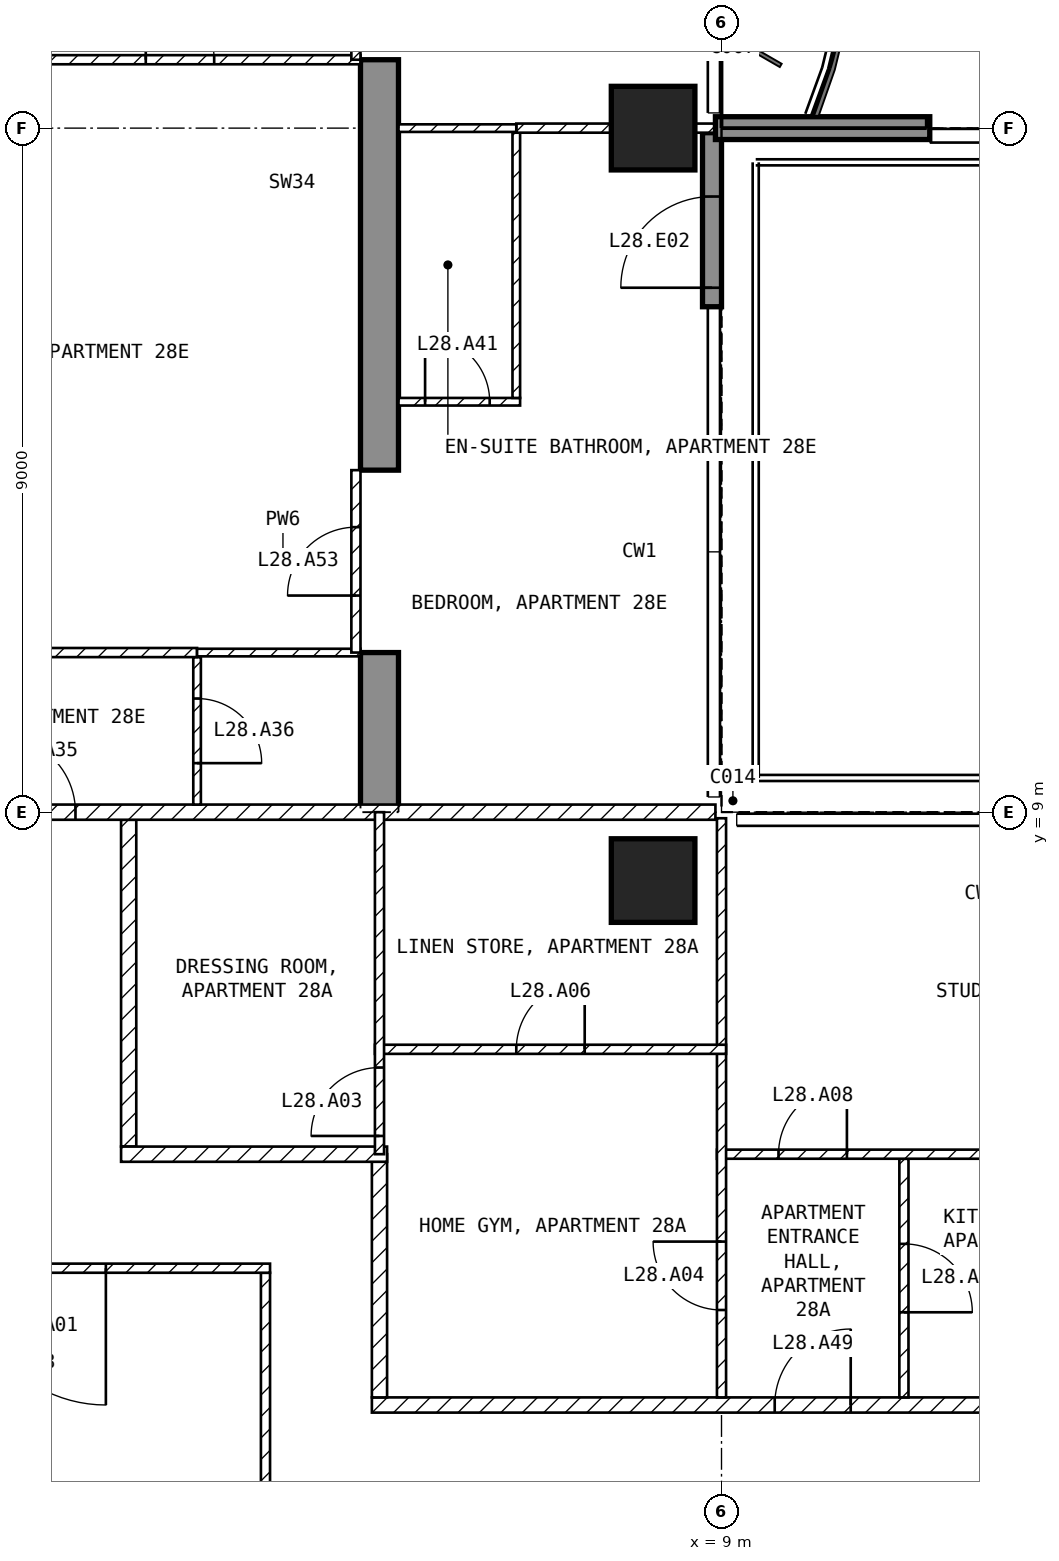
"""IFC4 building model, lengths in metres.
Left out: names, types, materials, properties, quantities, classifications, styles, units other than length and angle.
Written with IfcOpenShell. Run it as: python <this file> out.ifc"""

import sys

from ifc_helpers import new_model, si_unit, direction, frame, frame_2d, origin, origin_2d, place, context, subcontext, project, spatial, polyline, rectangle, outline, extrude, element, fill, save


model = new_model("IFC4")
c1 = context("Model", 3, precision=1e-05, world=origin(), true_north=direction((0.0, 1.0)))
c2 = subcontext(c1, "Body", "Model", "MODEL_VIEW")
j1 = project(units=[si_unit("LENGTHUNIT", "METRE"), si_unit("PLANEANGLEUNIT", "RADIAN")], contexts=[c1])
p1 = place(None, origin())
s1 = spatial("IfcSite", under=j1, at=p1, CompositionType="ELEMENT")
p2 = place(p1, origin())
s2 = spatial("IfcBuilding", under=s1, at=p2, CompositionType="ELEMENT")
p3 = place(p2, frame((0.0, 0.0, 119.9)))
s3 = spatial("IfcBuildingStorey", under=s2, at=p3, CompositionType="ELEMENT", Elevation=119.9)
for number, where, z_axis, x_axis in (
    (1, (8.1, 8.1, -0.25), (0.0, 0.0, 1.0), (1.0, 0.0, 0.0)),
    (2, (8.1, 18.0, -0.25), (0.0, 0.0, 1.0), (1.0, 0.0, 0.0)),
):
    element("IfcColumn", number, at=place(p3, frame(where, z_axis=z_axis, x_axis=x_axis)), inside=s3, PredefinedType="COLUMN", context=c2, shape_type="SweptSolid", body=[
        extrude(rectangle(XDim=1.1, YDim=1.1, at=origin_2d()), origin(), (0.0, 0.0, 1.0), 3.5),
    ])
p4 = place(p3, frame((4.25, 9.0, -0.25), z_axis=(1.0, 0.0, 0.0), x_axis=(0.0, 1.0, 0.0)))
e3 = element("IfcWall", 3, at=p4, inside=s3, PredefinedType="SHEAR", context=c2, shape_type="SweptSolid", body=[
    extrude(outline(polyline([(0.0, 0.0), (2.1, 0.0), (2.1, 2.65), (4.5, 2.65), (4.5, 0.0), (9.9, 0.0), (9.9, 2.65), (12.3, 2.65), (12.3, 0.0), (16.55, 0.0), (16.55, 3.5), (0.0, 3.5), (0.0, 0.0)])), origin(), (0.0, 0.0, 1.0), 0.5),
])
p5 = place(p3, frame((8.875, 15.65, 0.0), z_axis=(0.0, 0.0, 1.0), x_axis=(0.0, 1.0, 0.0)))
e4 = element("IfcWall", 4, at=p5, inside=s3, PredefinedType="SOLIDWALL", context=c2, shape_type="SweptSolid", body=[
    extrude(rectangle(XDim=2.29, YDim=0.25, at=frame_2d((1.145, 0.0))), origin(), (0.0, 0.0, 1.0), 3.25),
])
p6 = place(p5, frame((0.25, 0.0, 0.0)))
e5 = element("IfcOpeningElement", 5, at=p6, cuts=e4, PredefinedType="OPENING", context=c2, shape_type="SweptSolid", body=[
    extrude(rectangle(XDim=1.2, YDim=2.4, at=frame_2d((0.6, 1.2))), frame((0.0, 0.135, 0.0), z_axis=(0.0, -1.0, 0.0), x_axis=(1.0, 0.0, 0.0)), (0.0, 0.0, 1.0), 0.27),
])
p7 = place(p3, frame((8.92, 18.0, 0.0), z_axis=(0.0, 0.0, 1.0), x_axis=(1.0, 0.0, 0.0)))
e6 = element("IfcWall", 6, at=p7, inside=s3, PredefinedType="SOLIDWALL", context=c2, shape_type="SweptSolid", body=[
    extrude(rectangle(XDim=2.82, YDim=0.3, at=frame_2d((1.41, 0.0))), origin(), (0.0, 0.0, 1.0), 3.25),
])
p8 = place(p3, frame((3.0, -2.94, 0.0), z_axis=(0.0, 0.0, 1.0), x_axis=(0.0, 1.0, 0.0)))
e7 = element("IfcWall", 7, at=p8, inside=s3, PredefinedType="PARTITIONING", context=c2, shape_type="SweptSolid", body=[
    extrude(rectangle(XDim=5.88, YDim=0.12, at=frame_2d((2.94, 0.0))), origin(), (0.0, 0.0, 1.0), 3.25),
])
p9 = place(p3, frame((3.06, 3.0, 0.0), z_axis=(0.0, 0.0, 1.0), x_axis=(-1.0, 0.0, 0.0)))
e8 = element("IfcWall", 8, at=p9, inside=s3, PredefinedType="PARTITIONING", context=c2, shape_type="SweptSolid", body=[
    extrude(rectangle(XDim=6.12, YDim=0.12, at=frame_2d((3.06, 0.0))), origin(), (0.0, 0.0, 1.0), 3.25),
])
p10 = place(p9, frame((2.16, 0.0, 0.0)))
e9 = element("IfcOpeningElement", 9, at=p10, cuts=e8, PredefinedType="OPENING", context=c2, shape_type="SweptSolid", body=[
    extrude(rectangle(XDim=1.8, YDim=2.1, at=frame_2d((0.9, 1.05))), frame((0.0, 0.07, 0.0), z_axis=(0.0, -1.0, 0.0), x_axis=(1.0, 0.0, 0.0)), (0.0, 0.0, 1.0), 0.14),
])
p11 = place(p3, frame((4.4, 1.2, 0.0), z_axis=(0.0, 0.0, 1.0), x_axis=(1.0, 0.0, 0.0)))
e10 = element("IfcWall", 10, at=p11, inside=s3, PredefinedType="PARTITIONING", context=c2, shape_type="SweptSolid", body=[
    extrude(rectangle(XDim=17.2, YDim=0.2, at=frame_2d((8.6, 0.0))), origin(), (0.0, 0.0, 1.0), 3.25),
])
p12 = place(p11, frame((5.3, 0.0, 0.0)))
e11 = element("IfcOpeningElement", 11, at=p12, cuts=e10, PredefinedType="OPENING", context=c2, shape_type="SweptSolid", body=[
    extrude(rectangle(XDim=1.0, YDim=2.1, at=frame_2d((0.5, 1.05))), frame((0.0, 0.11, 0.0), z_axis=(0.0, -1.0, 0.0), x_axis=(1.0, 0.0, 0.0)), (0.0, 0.0, 1.0), 0.22),
])
p13 = place(p3, frame((4.5, 4.5, 0.0), z_axis=(0.0, 0.0, 1.0), x_axis=(0.0, -1.0, 0.0)))
e12 = element("IfcWall", 12, at=p13, inside=s3, PredefinedType="PARTITIONING", context=c2, shape_type="SweptSolid", body=[
    extrude(rectangle(XDim=3.2, YDim=0.2, at=frame_2d((1.6, 0.0))), origin(), (0.0, 0.0, 1.0), 3.25),
])
p14 = place(p3, frame((1.2, 8.9, 0.0), z_axis=(0.0, 0.0, 1.0), x_axis=(0.0, -1.0, 0.0)))
e13 = element("IfcWall", 13, at=p14, inside=s3, PredefinedType="PARTITIONING", context=c2, shape_type="SweptSolid", body=[
    extrude(rectangle(XDim=4.3, YDim=0.2, at=frame_2d((2.15, 0.0))), origin(), (0.0, 0.0, 1.0), 3.25),
])
p15 = place(p3, frame((1.1, 4.5, 0.0), z_axis=(0.0, 0.0, 1.0), x_axis=(1.0, 0.0, 0.0)))
e14 = element("IfcWall", 14, at=p15, inside=s3, PredefinedType="PARTITIONING", context=c2, shape_type="SweptSolid", body=[
    extrude(rectangle(XDim=3.5, YDim=0.2, at=frame_2d((1.75, 0.0))), origin(), (0.0, 0.0, 1.0), 3.25),
])
p16 = place(p3, frame((-8.92, 9.0, 0.0), z_axis=(0.0, 0.0, 1.0), x_axis=(1.0, 0.0, 0.0)))
e15 = element("IfcWall", 15, at=p16, inside=s3, PredefinedType="PARTITIONING", context=c2, shape_type="SweptSolid", body=[
    extrude(rectangle(XDim=17.84, YDim=0.2, at=frame_2d((8.92, 0.0))), origin(), (0.0, 0.0, 1.0), 3.25),
])
p17 = place(p16, frame((8.42, 0.0, 0.0)))
e16 = element("IfcOpeningElement", 16, at=p17, cuts=e15, PredefinedType="OPENING", context=c2, shape_type="SweptSolid", body=[
    extrude(rectangle(XDim=1.0, YDim=2.1, at=frame_2d((0.5, 1.05))), frame((0.0, 0.11, 0.0), z_axis=(0.0, -1.0, 0.0), x_axis=(1.0, 0.0, 0.0)), (0.0, 0.0, 1.0), 0.22),
])
p18 = place(p3, frame((11.4, 4.44, 0.0), z_axis=(0.0, 0.0, 1.0), x_axis=(0.0, -1.0, 0.0)))
e17 = element("IfcWall", 17, at=p18, inside=s3, PredefinedType="PARTITIONING", context=c2, shape_type="SweptSolid", body=[
    extrude(rectangle(XDim=3.14, YDim=0.12, at=frame_2d((1.57, 0.0))), origin(), (0.0, 0.0, 1.0), 3.25),
])
p19 = place(p18, frame((1.12, 0.0, 0.0)))
e18 = element("IfcOpeningElement", 18, at=p19, cuts=e17, PredefinedType="OPENING", context=c2, shape_type="SweptSolid", body=[
    extrude(rectangle(XDim=0.9, YDim=2.1, at=frame_2d((0.45, 1.05))), frame((0.0, 0.07, 0.0), z_axis=(0.0, -1.0, 0.0), x_axis=(1.0, 0.0, 0.0)), (0.0, 0.0, 1.0), 0.14),
])
p20 = place(p3, frame((8.94, 4.5, 0.0), z_axis=(0.0, 0.0, 1.0), x_axis=(1.0, 0.0, 0.0)))
e19 = element("IfcWall", 19, at=p20, inside=s3, PredefinedType="PARTITIONING", context=c2, shape_type="SweptSolid", body=[
    extrude(rectangle(XDim=5.46, YDim=0.12, at=frame_2d((2.73, 0.0))), origin(), (0.0, 0.0, 1.0), 3.25),
])
p21 = place(p20, frame((0.81, 0.0, 0.0)))
e20 = element("IfcOpeningElement", 20, at=p21, cuts=e19, PredefinedType="OPENING", context=c2, shape_type="SweptSolid", body=[
    extrude(rectangle(XDim=0.9, YDim=2.1, at=frame_2d((0.45, 1.05))), frame((0.0, 0.07, 0.0), z_axis=(0.0, -1.0, 0.0), x_axis=(1.0, 0.0, 0.0)), (0.0, 0.0, 1.0), 0.14),
])
p22 = place(p3, frame((9.0, 1.3, 0.0), z_axis=(0.0, 0.0, 1.0), x_axis=(0.0, 1.0, 0.0)))
e21 = element("IfcWall", 21, at=p22, inside=s3, PredefinedType="PARTITIONING", context=c2, shape_type="SweptSolid", body=[
    extrude(rectangle(XDim=7.62, YDim=0.12, at=frame_2d((3.81, 0.0))), origin(), (0.0, 0.0, 1.0), 3.25),
])
p23 = place(p22, frame((1.15, 0.0, 0.0)))
e22 = element("IfcOpeningElement", 22, at=p23, cuts=e21, PredefinedType="OPENING", context=c2, shape_type="SweptSolid", body=[
    extrude(rectangle(XDim=0.9, YDim=2.1, at=frame_2d((0.45, 1.05))), frame((0.0, 0.07, 0.0), z_axis=(0.0, -1.0, 0.0), x_axis=(1.0, 0.0, 0.0)), (0.0, 0.0, 1.0), 0.14),
])
p24 = place(p3, frame((4.44, 5.88, 0.0), z_axis=(0.0, 0.0, 1.0), x_axis=(1.0, 0.0, 0.0)))
e23 = element("IfcWall", 23, at=p24, inside=s3, PredefinedType="PARTITIONING", context=c2, shape_type="SweptSolid", body=[
    extrude(rectangle(XDim=4.62, YDim=0.12, at=frame_2d((2.31, 0.0))), origin(), (0.0, 0.0, 1.0), 3.25),
])
p25 = place(p24, frame((1.86, 0.0, 0.0)))
e24 = element("IfcOpeningElement", 24, at=p25, cuts=e23, PredefinedType="OPENING", context=c2, shape_type="SweptSolid", body=[
    extrude(rectangle(XDim=0.9, YDim=2.1, at=frame_2d((0.45, 1.05))), frame((0.0, 0.07, 0.0), z_axis=(0.0, -1.0, 0.0), x_axis=(1.0, 0.0, 0.0)), (0.0, 0.0, 1.0), 0.14),
])
p26 = place(p3, frame((4.5, 4.5, 0.0), z_axis=(0.0, 0.0, 1.0), x_axis=(0.0, 1.0, 0.0)))
e25 = element("IfcWall", 25, at=p26, inside=s3, PredefinedType="PARTITIONING", context=c2, shape_type="SweptSolid", body=[
    extrude(rectangle(XDim=4.5, YDim=0.12, at=frame_2d((2.25, 0.0))), origin(), (0.0, 0.0, 1.0), 3.25),
])
p27 = place(p26, frame((0.24, 0.0, 0.0)))
e26 = element("IfcOpeningElement", 26, at=p27, cuts=e25, PredefinedType="OPENING", context=c2, shape_type="SweptSolid", body=[
    extrude(rectangle(XDim=0.9, YDim=2.1, at=frame_2d((0.45, 1.05))), frame((0.0, 0.07, 0.0), z_axis=(0.0, -1.0, 0.0), x_axis=(1.0, 0.0, 0.0)), (0.0, 0.0, 1.0), 0.14),
])
p28 = place(p3, frame((2.1, 11.04, 0.0), z_axis=(0.0, 0.0, 1.0), x_axis=(0.0, -1.0, 0.0)))
e27 = element("IfcWall", 27, at=p28, inside=s3, PredefinedType="PARTITIONING", context=c2, shape_type="SweptSolid", body=[
    extrude(rectangle(XDim=1.94, YDim=0.1, at=frame_2d((0.97, 0.0))), origin(), (0.0, 0.0, 1.0), 3.25),
])
p29 = place(p28, frame((0.545, 0.0, 0.0)))
e28 = element("IfcOpeningElement", 28, at=p29, cuts=e27, PredefinedType="OPENING", context=c2, shape_type="SweptSolid", body=[
    extrude(rectangle(XDim=0.85, YDim=2.1, at=frame_2d((0.425, 1.05))), frame((0.0, 0.06, 0.0), z_axis=(0.0, -1.0, 0.0), x_axis=(1.0, 0.0, 0.0)), (0.0, 0.0, 1.0), 0.12),
])
p30 = place(p3, frame((-4.25, 11.1, 0.0), z_axis=(0.0, 0.0, 1.0), x_axis=(1.0, 0.0, 0.0)))
e29 = element("IfcWall", 29, at=p30, inside=s3, PredefinedType="PARTITIONING", context=c2, shape_type="SweptSolid", body=[
    extrude(rectangle(XDim=6.35, YDim=0.12, at=frame_2d((3.175, 0.0))), origin(), (0.0, 0.0, 1.0), 3.25),
])
p31 = place(p30, frame((2.725, 0.0, 0.0)))
e30 = element("IfcOpeningElement", 30, at=p31, cuts=e29, PredefinedType="OPENING", context=c2, shape_type="SweptSolid", body=[
    extrude(rectangle(XDim=0.9, YDim=2.1, at=frame_2d((0.45, 1.05))), frame((0.0, 0.07, 0.0), z_axis=(0.0, -1.0, 0.0), x_axis=(1.0, 0.0, 0.0)), (0.0, 0.0, 1.0), 0.14),
])
p32 = place(p3, frame((2.1, 11.1, 0.0), z_axis=(0.0, 0.0, 1.0), x_axis=(1.0, 0.0, 0.0)))
e31 = element("IfcWall", 31, at=p32, inside=s3, PredefinedType="PARTITIONING", context=c2, shape_type="SweptSolid", body=[
    extrude(rectangle(XDim=2.15, YDim=0.1, at=frame_2d((1.075, 0.0))), origin(), (0.0, 0.0, 1.0), 3.25),
])
p33 = place(p3, frame((-4.25, 18.9, 0.0), z_axis=(0.0, 0.0, 1.0), x_axis=(1.0, 0.0, 0.0)))
e32 = element("IfcWall", 32, at=p33, inside=s3, PredefinedType="PARTITIONING", context=c2, shape_type="SweptSolid", body=[
    extrude(rectangle(XDim=8.5, YDim=0.12, at=frame_2d((4.25, 0.0))), origin(), (0.0, 0.0, 1.0), 3.25),
])
p34 = place(p33, frame((5.675, 0.0, 0.0)))
e33 = element("IfcOpeningElement", 33, at=p34, cuts=e32, PredefinedType="OPENING", context=c2, shape_type="SweptSolid", body=[
    extrude(rectangle(XDim=0.9, YDim=2.1, at=frame_2d((0.45, 1.05))), frame((0.0, 0.07, 0.0), z_axis=(0.0, -1.0, 0.0), x_axis=(1.0, 0.0, 0.0)), (0.0, 0.0, 1.0), 0.14),
])
p35 = place(p3, frame((4.75, 14.4, 0.0), z_axis=(0.0, 0.0, 1.0), x_axis=(1.0, 0.0, 0.0)))
e34 = element("IfcWall", 34, at=p35, inside=s3, PredefinedType="PARTITIONING", context=c2, shape_type="SweptSolid", body=[
    extrude(rectangle(XDim=1.6, YDim=0.1, at=frame_2d((0.8, 0.0))), origin(), (0.0, 0.0, 1.0), 3.25),
])
p36 = place(p35, frame((0.35, 0.0, 0.0)))
e35 = element("IfcOpeningElement", 35, at=p36, cuts=e34, PredefinedType="OPENING", context=c2, shape_type="SweptSolid", body=[
    extrude(rectangle(XDim=0.85, YDim=2.1, at=frame_2d((0.425, 1.05))), frame((0.0, 0.06, 0.0), z_axis=(0.0, -1.0, 0.0), x_axis=(1.0, 0.0, 0.0)), (0.0, 0.0, 1.0), 0.12),
])
p37 = place(p3, frame((6.3, 14.45, 0.0), z_axis=(0.0, 0.0, 1.0), x_axis=(0.0, 1.0, 0.0)))
e36 = element("IfcWall", 36, at=p37, inside=s3, PredefinedType="PARTITIONING", context=c2, shape_type="SweptSolid", body=[
    extrude(rectangle(XDim=3.49, YDim=0.1, at=frame_2d((1.745, 0.0))), origin(), (0.0, 0.0, 1.0), 3.25),
])
p38 = place(p3, frame((6.3, 18.0, 0.0), z_axis=(0.0, 0.0, 1.0), x_axis=(1.0, 0.0, 0.0)))
e37 = element("IfcWall", 37, at=p38, inside=s3, PredefinedType="PARTITIONING", context=c2, shape_type="SweptSolid", body=[
    extrude(rectangle(XDim=2.62, YDim=0.12, at=frame_2d((1.31, 0.0))), origin(), (0.0, 0.0, 1.0), 2.414),
])
p39 = place(p3, frame((4.75, 18.0, 0.0), z_axis=(0.0, 0.0, 1.0), x_axis=(1.0, 0.0, 0.0)))
e38 = element("IfcWall", 38, at=p39, inside=s3, PredefinedType="PARTITIONING", context=c2, shape_type="SweptSolid", body=[
    extrude(rectangle(XDim=1.55, YDim=0.1, at=frame_2d((0.775, 0.0))), origin(), (0.0, 0.0, 1.0), 2.414),
])
p40 = place(p3, frame((4.19, 11.1, 0.0), z_axis=(0.0, 0.0, 1.0), x_axis=(0.0, 1.0, 0.0)))
e39 = element("IfcWall", 39, at=p40, inside=s3, PredefinedType="PARTITIONING", context=c2, shape_type="SweptSolid", body=[
    extrude(rectangle(XDim=2.4, YDim=0.12, at=frame_2d((1.2, 0.0))), origin(), (0.0, 0.0, 1.0), 2.4),
])
p41 = place(p40, frame((0.75, 0.0, 0.0)))
e40 = element("IfcOpeningElement", 40, at=p41, cuts=e39, PredefinedType="OPENING", context=c2, shape_type="SweptSolid", body=[
    extrude(rectangle(XDim=0.9, YDim=2.1, at=frame_2d((0.45, 1.05))), frame((0.0, 0.07, 0.0), z_axis=(0.0, -1.0, 0.0), x_axis=(1.0, 0.0, 0.0)), (0.0, 0.0, 1.0), 0.14),
])
p42 = place(p3, frame((4.19, 18.9, 0.0), z_axis=(0.0, 0.0, 1.0), x_axis=(0.0, 1.0, 0.0)))
e41 = element("IfcWall", 41, at=p42, inside=s3, PredefinedType="PARTITIONING", context=c2, shape_type="SweptSolid", body=[
    extrude(rectangle(XDim=2.4, YDim=0.12, at=frame_2d((1.2, 0.0))), origin(), (0.0, 0.0, 1.0), 2.4),
])
p43 = place(p42, frame((0.55, 0.0, 0.0)))
e42 = element("IfcOpeningElement", 42, at=p43, cuts=e41, PredefinedType="OPENING", context=c2, shape_type="SweptSolid", body=[
    extrude(rectangle(XDim=0.9, YDim=2.1, at=frame_2d((0.45, 1.05))), frame((0.0, 0.07, 0.0), z_axis=(0.0, -1.0, 0.0), x_axis=(1.0, 0.0, 0.0)), (0.0, 0.0, 1.0), 0.14),
])
p44 = place(p6, origin())
e43 = element("IfcDoor", 43, at=p44, inside=s3, OperationType="SINGLE_SWING_LEFT", PredefinedType="DOOR", context=c2, shape_type="SweptSolid", body=[
    extrude(rectangle(XDim=1.2, YDim=2.4, at=frame_2d((0.6, 1.2))), frame((0.0, 0.025, 0.0), z_axis=(0.0, -1.0, 0.0), x_axis=(1.0, 0.0, 0.0)), (0.0, 0.0, 1.0), 0.05),
])
fill(e5, e43)
p45 = place(p10, origin())
e44 = element("IfcDoor", 44, at=p45, inside=s3, OperationType="SINGLE_SWING_LEFT", PredefinedType="DOOR", context=c2, shape_type="SweptSolid", body=[
    extrude(rectangle(XDim=1.8, YDim=2.1, at=frame_2d((0.9, 1.05))), frame((0.0, 0.025, 0.0), z_axis=(0.0, -1.0, 0.0), x_axis=(1.0, 0.0, 0.0)), (0.0, 0.0, 1.0), 0.05),
])
fill(e9, e44)
p46 = place(p27, origin())
e45 = element("IfcDoor", 45, at=p46, inside=s3, OperationType="SINGLE_SWING_LEFT", PredefinedType="DOOR", context=c2, shape_type="SweptSolid", body=[
    extrude(rectangle(XDim=0.9, YDim=2.1, at=frame_2d((0.45, 1.05))), frame((0.0, 0.025, 0.0), z_axis=(0.0, -1.0, 0.0), x_axis=(1.0, 0.0, 0.0)), (0.0, 0.0, 1.0), 0.05),
])
fill(e26, e45)
p47 = place(p23, origin())
e46 = element("IfcDoor", 46, at=p47, inside=s3, OperationType="SINGLE_SWING_RIGHT", PredefinedType="DOOR", context=c2, shape_type="SweptSolid", body=[
    extrude(rectangle(XDim=0.9, YDim=2.1, at=frame_2d((0.45, 1.05))), frame((0.0, 0.025, 0.0), z_axis=(0.0, -1.0, 0.0), x_axis=(1.0, 0.0, 0.0)), (0.0, 0.0, 1.0), 0.05),
])
fill(e22, e46)
p48 = place(p19, origin())
e47 = element("IfcDoor", 47, at=p48, inside=s3, OperationType="SINGLE_SWING_RIGHT", PredefinedType="DOOR", context=c2, shape_type="SweptSolid", body=[
    extrude(rectangle(XDim=0.9, YDim=2.1, at=frame_2d((0.45, 1.05))), frame((0.0, 0.025, 0.0), z_axis=(0.0, -1.0, 0.0), x_axis=(1.0, 0.0, 0.0)), (0.0, 0.0, 1.0), 0.05),
])
fill(e18, e47)
p49 = place(p25, origin())
e48 = element("IfcDoor", 48, at=p49, inside=s3, OperationType="SINGLE_SWING_RIGHT", PredefinedType="DOOR", context=c2, shape_type="SweptSolid", body=[
    extrude(rectangle(XDim=0.9, YDim=2.1, at=frame_2d((0.45, 1.05))), frame((0.0, 0.025, 0.0), z_axis=(0.0, -1.0, 0.0), x_axis=(1.0, 0.0, 0.0)), (0.0, 0.0, 1.0), 0.05),
])
fill(e24, e48)
p50 = place(p21, origin())
e49 = element("IfcDoor", 49, at=p50, inside=s3, OperationType="SINGLE_SWING_RIGHT", PredefinedType="DOOR", context=c2, shape_type="SweptSolid", body=[
    extrude(rectangle(XDim=0.9, YDim=2.1, at=frame_2d((0.45, 1.05))), frame((0.0, 0.025, 0.0), z_axis=(0.0, -1.0, 0.0), x_axis=(1.0, 0.0, 0.0)), (0.0, 0.0, 1.0), 0.05),
])
fill(e20, e49)
p51 = place(p17, origin())
e50 = element("IfcDoor", 50, at=p51, inside=s3, OperationType="SINGLE_SWING_LEFT", PredefinedType="DOOR", context=c2, shape_type="SweptSolid", body=[
    extrude(rectangle(XDim=1.0, YDim=2.1, at=frame_2d((0.5, 1.05))), frame((0.0, 0.025, 0.0), z_axis=(0.0, -1.0, 0.0), x_axis=(1.0, 0.0, 0.0)), (0.0, 0.0, 1.0), 0.05),
])
fill(e16, e50)
p52 = place(p29, origin())
e51 = element("IfcDoor", 51, at=p52, inside=s3, OperationType="SINGLE_SWING_RIGHT", PredefinedType="DOOR", context=c2, shape_type="SweptSolid", body=[
    extrude(rectangle(XDim=0.85, YDim=2.1, at=frame_2d((0.425, 1.05))), frame((0.0, 0.025, 0.0), z_axis=(0.0, -1.0, 0.0), x_axis=(1.0, 0.0, 0.0)), (0.0, 0.0, 1.0), 0.05),
])
fill(e28, e51)
p53 = place(p34, origin())
e52 = element("IfcDoor", 52, at=p53, inside=s3, OperationType="SINGLE_SWING_LEFT", PredefinedType="DOOR", context=c2, shape_type="SweptSolid", body=[
    extrude(rectangle(XDim=0.9, YDim=2.1, at=frame_2d((0.45, 1.05))), frame((0.0, 0.025, 0.0), z_axis=(0.0, -1.0, 0.0), x_axis=(1.0, 0.0, 0.0)), (0.0, 0.0, 1.0), 0.05),
])
fill(e33, e52)
p54 = place(p36, origin())
e53 = element("IfcDoor", 53, at=p54, inside=s3, OperationType="SINGLE_SWING_LEFT", PredefinedType="DOOR", context=c2, shape_type="SweptSolid", body=[
    extrude(rectangle(XDim=0.85, YDim=2.1, at=frame_2d((0.425, 1.05))), frame((0.0, 0.025, 0.0), z_axis=(0.0, -1.0, 0.0), x_axis=(1.0, 0.0, 0.0)), (0.0, 0.0, 1.0), 0.05),
])
fill(e35, e53)
p55 = place(p12, origin())
e54 = element("IfcDoor", 54, at=p55, inside=s3, OperationType="SINGLE_SWING_RIGHT", PredefinedType="DOOR", context=c2, shape_type="SweptSolid", body=[
    extrude(rectangle(XDim=1.0, YDim=2.1, at=frame_2d((0.5, 1.05))), frame((0.0, 0.025, 0.0), z_axis=(0.0, -1.0, 0.0), x_axis=(1.0, 0.0, 0.0)), (0.0, 0.0, 1.0), 0.05),
])
fill(e11, e54)
p56 = place(p41, origin())
e55 = element("IfcDoor", 55, at=p56, inside=s3, OperationType="SINGLE_SWING_LEFT", PredefinedType="DOOR", context=c2, shape_type="SweptSolid", body=[
    extrude(rectangle(XDim=0.9, YDim=2.1, at=frame_2d((0.45, 1.05))), frame((0.0, 0.025, 0.0), z_axis=(0.0, -1.0, 0.0), x_axis=(1.0, 0.0, 0.0)), (0.0, 0.0, 1.0), 0.05),
])
fill(e40, e55)
save(model, sys.argv[1])
